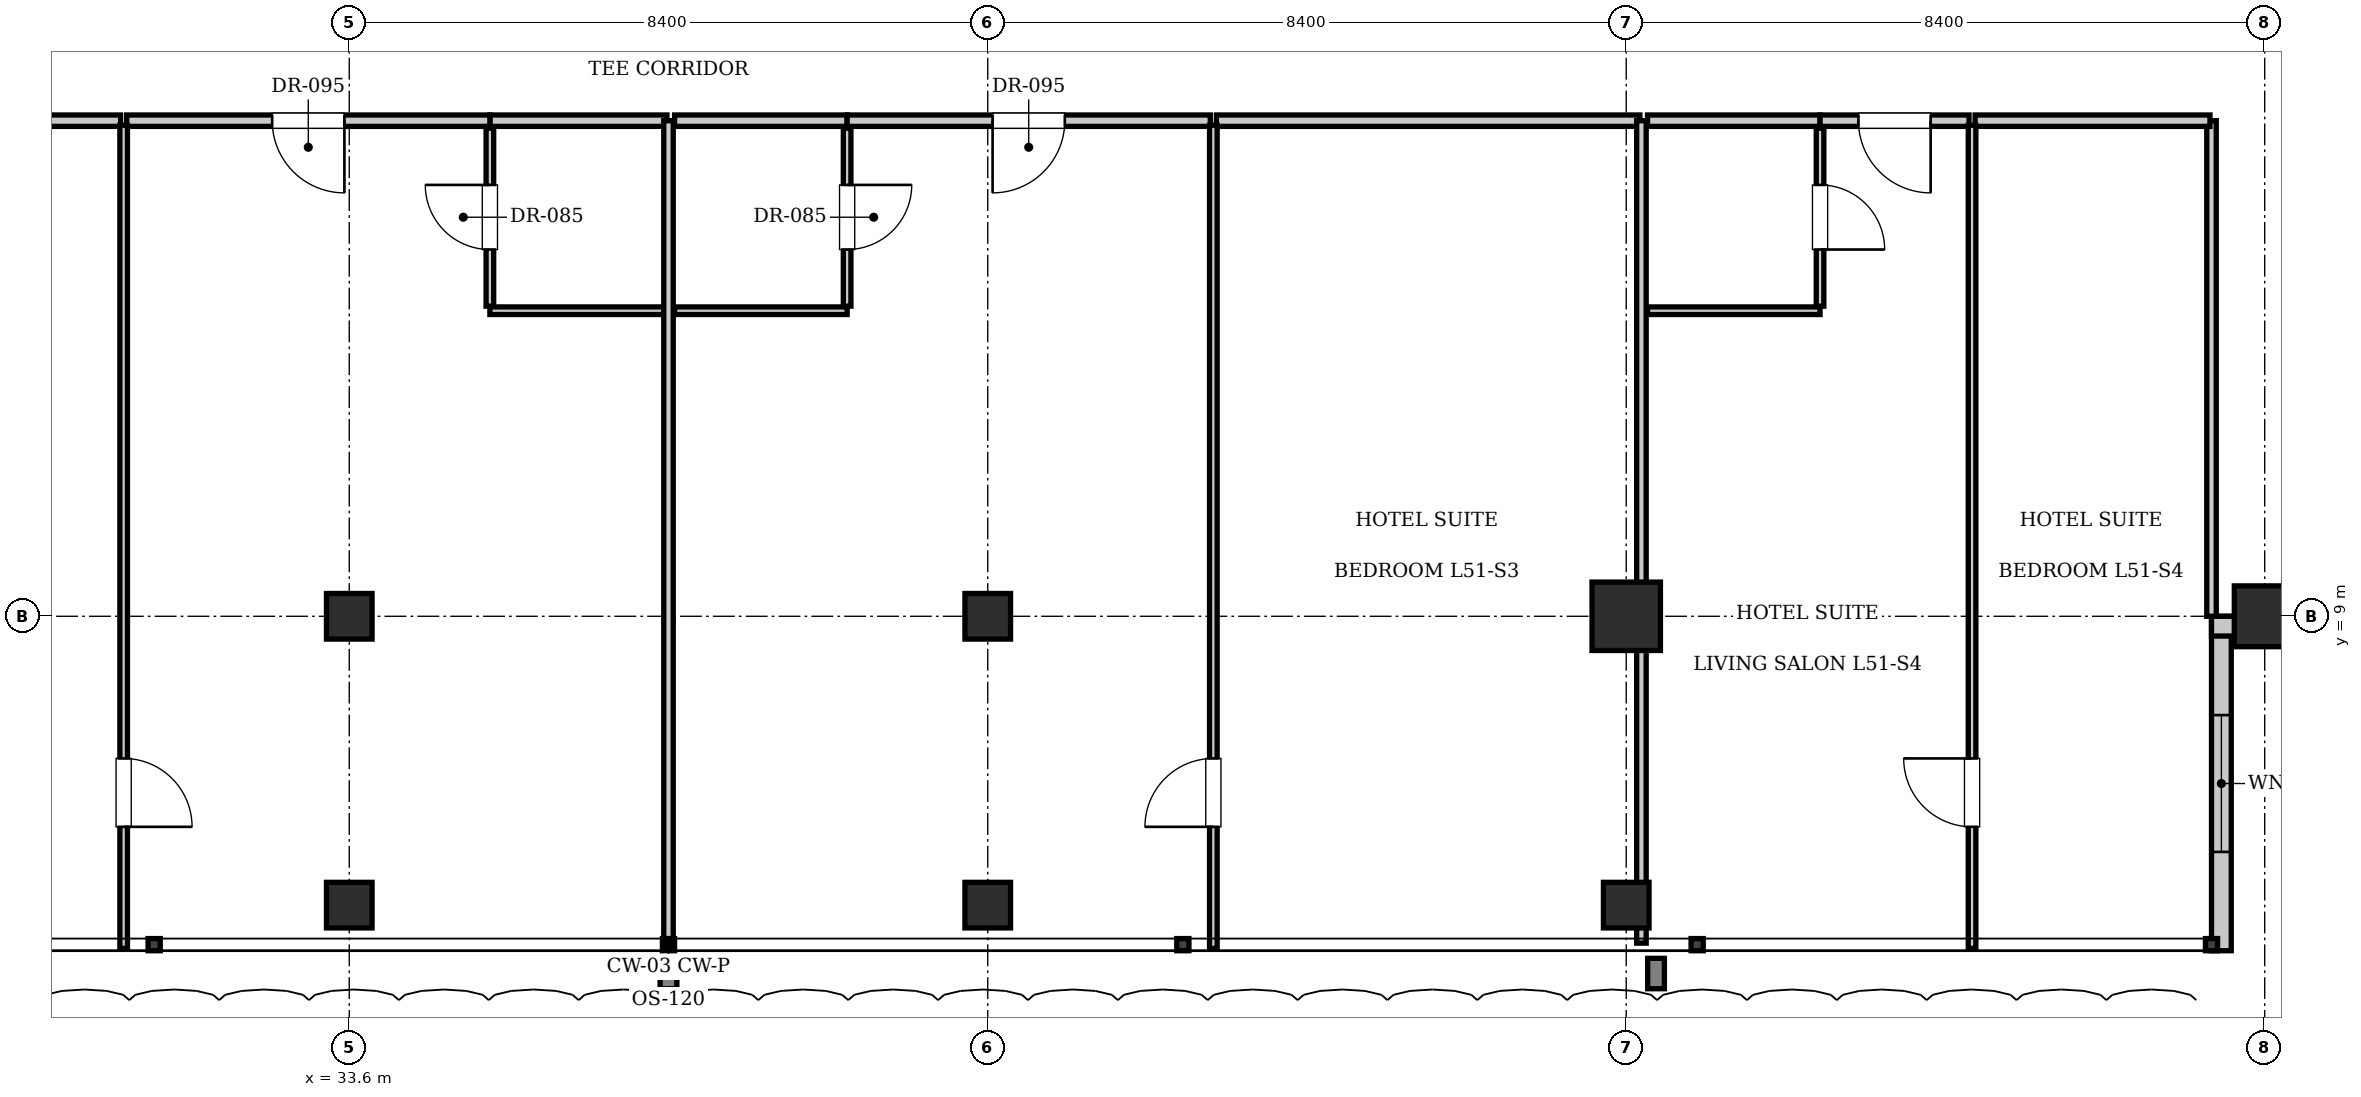
"""IFC4 building model, lengths in metres.
Left out: names, types, materials, properties, quantities, classifications, styles, units other than length and angle.
Written with IfcOpenShell. Run it as: python <this file> out.ifc"""

import sys

from ifc_helpers import new_model, si_unit, direction, frame, frame_2d, origin, origin_2d, place, context, subcontext, project, spatial, rectangle, i_section, extrude, element, fill, save


model = new_model("IFC4")
c1 = context("Model", 3, precision=1e-05, world=origin(), true_north=direction((0.0, 1.0)))
c2 = subcontext(c1, "Body", "Model", "MODEL_VIEW")
j1 = project(units=[si_unit("LENGTHUNIT", "METRE"), si_unit("PLANEANGLEUNIT", "RADIAN")], contexts=[c1])
p1 = place(None, origin())
s1 = spatial("IfcSite", under=j1, at=p1, CompositionType="ELEMENT")
p2 = place(p1, origin())
s2 = spatial("IfcBuilding", under=s1, at=p2, CompositionType="ELEMENT")
p3 = place(p2, frame((0.0, 0.0, 208.25)))
s3 = spatial("IfcBuildingStorey", under=s2, at=p3, CompositionType="ELEMENT", Elevation=208.25)
p4 = place(p3, frame((50.4, 9.0, 0.0), z_axis=(0.0, 0.0, 1.0), x_axis=(1.0, 0.0, 0.0)))
e1 = element("IfcColumn", 1, at=p4, inside=s3, PredefinedType="COLUMN", context=c2, shape_type="SweptSolid", body=[
    extrude(rectangle(XDim=0.9, YDim=0.9, at=origin_2d()), origin(), (0.0, 0.0, 1.0), 3.85),
])
for number, where, z_axis, x_axis in (
    (2, (33.6, 9.0, 0.0), (0.0, 0.0, 1.0), (1.0, 0.0, 0.0)),
    (3, (42.0, 9.0, 0.0), (0.0, 0.0, 1.0), (1.0, 0.0, 0.0)),
):
    element("IfcColumn", number, at=place(p3, frame(where, z_axis=z_axis, x_axis=x_axis)), inside=s3, PredefinedType="COLUMN", context=c2, shape_type="SweptSolid", body=[
        extrude(i_section(OverallWidth=0.6, OverallDepth=0.6, WebThickness=0.025, FlangeThickness=0.038, at=origin_2d()), origin(), (0.0, 0.0, 1.0), 3.85),
    ])
p5 = place(p3, frame((58.8, 9.0, 0.0), z_axis=(0.0, 0.0, 1.0), x_axis=(1.0, 0.0, 0.0)))
e4 = element("IfcColumn", 4, at=p5, inside=s3, PredefinedType="COLUMN", context=c2, shape_type="SweptSolid", body=[
    extrude(rectangle(XDim=0.8, YDim=0.8, at=origin_2d()), origin(), (0.0, 0.0, 1.0), 3.85),
])
for number, where, z_axis, x_axis in (
    (5, (33.6, 5.2, 0.0), (0.0, 0.0, 1.0), (1.0, 0.0, 0.0)),
    (6, (42.0, 5.2, 0.0), (0.0, 0.0, 1.0), (1.0, 0.0, 0.0)),
    (7, (50.4, 5.2, 0.0), (0.0, 0.0, 1.0), (1.0, 0.0, 0.0)),
):
    element("IfcColumn", number, at=place(p3, frame(where, z_axis=z_axis, x_axis=x_axis)), inside=s3, PredefinedType="COLUMN", context=c2, shape_type="SweptSolid", body=[
        extrude(i_section(OverallWidth=0.6, OverallDepth=0.6, WebThickness=0.025, FlangeThickness=0.038, at=origin_2d()), origin(), (0.0, 0.0, 1.0), 3.85),
    ])
p6 = place(p3, frame((58.23, 9.0, 0.0), z_axis=(0.0, 0.0, 1.0), x_axis=(0.0, -1.0, 0.0)))
e8 = element("IfcWall", 8, at=p6, inside=s3, PredefinedType="SOLIDWALL", context=c2, shape_type="SweptSolid", body=[
    extrude(rectangle(XDim=4.4, YDim=0.26, at=frame_2d((2.2, 0.0))), origin(), (0.0, 0.0, 1.0), 3.61),
])
p7 = place(p6, frame((1.3, 0.0, 0.9)))
e9 = element("IfcOpeningElement", 9, at=p7, cuts=e8, PredefinedType="OPENING", context=c2, shape_type="SweptSolid", body=[
    extrude(rectangle(XDim=1.8, YDim=2.1, at=frame_2d((0.9, 1.05))), frame((0.0, 0.14, 0.0), z_axis=(0.0, -1.0, 0.0), x_axis=(1.0, 0.0, 0.0)), (0.0, 0.0, 1.0), 0.28),
])
p8 = place(p3, frame((62.5, 8.87, 0.0), z_axis=(0.0, 0.0, 1.0), x_axis=(-1.0, 0.0, 0.0)))
e10 = element("IfcWall", 10, at=p8, inside=s3, PredefinedType="SOLIDWALL", context=c2, shape_type="SweptSolid", body=[
    extrude(rectangle(XDim=4.4, YDim=0.26, at=frame_2d((2.2, 0.0))), origin(), (0.0, 0.0, 1.0), 3.071),
])
p9 = place(p8, frame((1.3, 0.0, 0.9)))
e11 = element("IfcOpeningElement", 11, at=p9, cuts=e10, PredefinedType="OPENING", context=c2, shape_type="SweptSolid", body=[
    extrude(rectangle(XDim=1.8, YDim=2.1, at=frame_2d((0.9, 1.05))), frame((0.0, 0.14, 0.0), z_axis=(0.0, -1.0, 0.0), x_axis=(1.0, 0.0, 0.0)), (0.0, 0.0, 1.0), 0.28),
])
p10 = place(p3, frame((58.1, 9.0, 0.0), z_axis=(0.0, 0.0, 1.0), x_axis=(0.0, 1.0, 0.0)))
e12 = element("IfcWall", 12, at=p10, inside=s3, PredefinedType="PARTITIONING", context=c2, shape_type="SweptSolid", body=[
    extrude(rectangle(XDim=6.52, YDim=0.125, at=frame_2d((3.26, 0.0))), origin(), (0.0, 0.0, 1.0), 3.61),
])
p11 = place(p3, frame((35.45, 15.52, 0.0), z_axis=(0.0, 0.0, 1.0), x_axis=(1.0, 0.0, 0.0)))
e13 = element("IfcWall", 13, at=p11, inside=s3, PredefinedType="PARTITIONING", context=c2, shape_type="SweptSolid", body=[
    extrude(rectangle(XDim=2.33, YDim=0.15, at=frame_2d((1.165, 0.0))), origin(), (0.0, 0.0, 1.0), 3.61),
])
p12 = place(p3, frame((35.45, 13.02, 0.0), z_axis=(0.0, 0.0, 1.0), x_axis=(1.0, 0.0, 0.0)))
e14 = element("IfcWall", 14, at=p12, inside=s3, PredefinedType="PARTITIONING", context=c2, shape_type="SweptSolid", body=[
    extrude(rectangle(XDim=2.31, YDim=0.1, at=frame_2d((1.155, 0.0))), origin(), (0.0, 0.0, 1.0), 3.61),
])
p13 = place(p3, frame((35.45, 13.08, 0.0), z_axis=(0.0, 0.0, 1.0), x_axis=(0.0, 1.0, 0.0)))
e15 = element("IfcWall", 15, at=p13, inside=s3, PredefinedType="PARTITIONING", context=c2, shape_type="SweptSolid", body=[
    extrude(rectangle(XDim=2.34, YDim=0.1, at=frame_2d((1.17, 0.0))), origin(), (0.0, 0.0, 1.0), 3.61),
])
p14 = place(p13, frame((0.745, 0.0, 0.0)))
e16 = element("IfcOpeningElement", 16, at=p14, cuts=e15, PredefinedType="OPENING", context=c2, shape_type="SweptSolid", body=[
    extrude(rectangle(XDim=0.85, YDim=2.1, at=frame_2d((0.425, 1.05))), frame((0.0, 0.06, 0.0), z_axis=(0.0, -1.0, 0.0), x_axis=(1.0, 0.0, 0.0)), (0.0, 0.0, 1.0), 0.12),
])
p15 = place(p3, frame((25.02, 15.52, 0.0), z_axis=(0.0, 0.0, 1.0), x_axis=(1.0, 0.0, 0.0)))
e17 = element("IfcWall", 17, at=p15, inside=s3, PredefinedType="PARTITIONING", context=c2, shape_type="SweptSolid", body=[
    extrude(rectangle(XDim=5.572, YDim=0.15, at=frame_2d((2.786, 0.0))), origin(), (0.0, 0.0, 1.0), 3.61),
])
p16 = place(p3, frame((30.672, 15.52, 0.0), z_axis=(0.0, 0.0, 1.0), x_axis=(1.0, 0.0, 0.0)))
e18 = element("IfcWall", 18, at=p16, inside=s3, PredefinedType="PARTITIONING", context=c2, shape_type="SweptSolid", body=[
    extrude(rectangle(XDim=4.778, YDim=0.15, at=frame_2d((2.389, 0.0))), origin(), (0.0, 0.0, 1.0), 3.61),
])
p17 = place(p16, frame((1.914, 0.0, 0.0)))
e19 = element("IfcOpeningElement", 19, at=p17, cuts=e18, PredefinedType="OPENING", context=c2, shape_type="SweptSolid", body=[
    extrude(rectangle(XDim=0.95, YDim=2.15, at=frame_2d((0.475, 1.075))), frame((0.0, 0.085, 0.0), z_axis=(0.0, -1.0, 0.0), x_axis=(1.0, 0.0, 0.0)), (0.0, 0.0, 1.0), 0.17),
])
p18 = place(p3, frame((30.632, 4.63, 0.0), z_axis=(0.0, 0.0, 1.0), x_axis=(0.0, 1.0, 0.0)))
e20 = element("IfcWall", 20, at=p18, inside=s3, PredefinedType="PARTITIONING", context=c2, shape_type="SweptSolid", body=[
    extrude(rectangle(XDim=10.83, YDim=0.1, at=frame_2d((5.415, 0.0))), origin(), (0.0, 0.0, 1.0), 3.61),
])
p19 = place(p18, frame((1.6, 0.0, 0.0)))
e21 = element("IfcOpeningElement", 21, at=p19, cuts=e20, PredefinedType="OPENING", context=c2, shape_type="SweptSolid", body=[
    extrude(rectangle(XDim=0.9, YDim=2.1, at=frame_2d((0.45, 1.05))), frame((0.0, 0.06, 0.0), z_axis=(0.0, -1.0, 0.0), x_axis=(1.0, 0.0, 0.0)), (0.0, 0.0, 1.0), 0.12),
])
p20 = place(p3, frame((37.8, 4.7, 0.0), z_axis=(0.0, 0.0, 1.0), x_axis=(0.0, 1.0, 0.0)))
e22 = element("IfcWall", 22, at=p20, inside=s3, PredefinedType="PARTITIONING", context=c2, shape_type="SweptSolid", body=[
    extrude(rectangle(XDim=10.82, YDim=0.125, at=frame_2d((5.41, 0.0))), origin(), (0.0, 0.0, 1.0), 3.207),
])
p21 = place(p3, frame((37.88, 15.52, 0.0), z_axis=(0.0, 0.0, 1.0), x_axis=(1.0, 0.0, 0.0)))
e23 = element("IfcWall", 23, at=p21, inside=s3, PredefinedType="PARTITIONING", context=c2, shape_type="SweptSolid", body=[
    extrude(rectangle(XDim=2.27, YDim=0.15, at=frame_2d((1.135, 0.0))), origin(), (0.0, 0.0, 1.0), 3.61),
])
p22 = place(p3, frame((37.88, 13.02, 0.0), z_axis=(0.0, 0.0, 1.0), x_axis=(1.0, 0.0, 0.0)))
e24 = element("IfcWall", 24, at=p22, inside=s3, PredefinedType="PARTITIONING", context=c2, shape_type="SweptSolid", body=[
    extrude(rectangle(XDim=2.27, YDim=0.1, at=frame_2d((1.135, 0.0))), origin(), (0.0, 0.0, 1.0), 3.61),
])
p23 = place(p3, frame((40.15, 13.08, 0.0), z_axis=(0.0, 0.0, 1.0), x_axis=(0.0, 1.0, 0.0)))
e25 = element("IfcWall", 25, at=p23, inside=s3, PredefinedType="PARTITIONING", context=c2, shape_type="SweptSolid", body=[
    extrude(rectangle(XDim=2.34, YDim=0.1, at=frame_2d((1.17, 0.0))), origin(), (0.0, 0.0, 1.0), 3.61),
])
p24 = place(p23, frame((0.745, 0.0, 0.0)))
e26 = element("IfcOpeningElement", 26, at=p24, cuts=e25, PredefinedType="OPENING", context=c2, shape_type="SweptSolid", body=[
    extrude(rectangle(XDim=0.85, YDim=2.1, at=frame_2d((0.425, 1.05))), frame((0.0, 0.06, 0.0), z_axis=(0.0, -1.0, 0.0), x_axis=(1.0, 0.0, 0.0)), (0.0, 0.0, 1.0), 0.12),
])
p25 = place(p3, frame((40.15, 15.52, 0.0), z_axis=(0.0, 0.0, 1.0), x_axis=(1.0, 0.0, 0.0)))
e27 = element("IfcWall", 27, at=p25, inside=s3, PredefinedType="PARTITIONING", context=c2, shape_type="SweptSolid", body=[
    extrude(rectangle(XDim=4.778, YDim=0.15, at=frame_2d((2.389, 0.0))), origin(), (0.0, 0.0, 1.0), 3.61),
])
p26 = place(p25, frame((1.914, 0.0, 0.0)))
e28 = element("IfcOpeningElement", 28, at=p26, cuts=e27, PredefinedType="OPENING", context=c2, shape_type="SweptSolid", body=[
    extrude(rectangle(XDim=0.95, YDim=2.15, at=frame_2d((0.475, 1.075))), frame((0.0, 0.085, 0.0), z_axis=(0.0, -1.0, 0.0), x_axis=(1.0, 0.0, 0.0)), (0.0, 0.0, 1.0), 0.17),
])
p27 = place(p3, frame((45.008, 15.52, 0.0), z_axis=(0.0, 0.0, 1.0), x_axis=(1.0, 0.0, 0.0)))
e29 = element("IfcWall", 29, at=p27, inside=s3, PredefinedType="PARTITIONING", context=c2, shape_type="SweptSolid", body=[
    extrude(rectangle(XDim=5.572, YDim=0.15, at=frame_2d((2.786, 0.0))), origin(), (0.0, 0.0, 1.0), 3.61),
])
p28 = place(p3, frame((44.968, 4.63, 0.0), z_axis=(0.0, 0.0, 1.0), x_axis=(0.0, 1.0, 0.0)))
e30 = element("IfcWall", 30, at=p28, inside=s3, PredefinedType="PARTITIONING", context=c2, shape_type="SweptSolid", body=[
    extrude(rectangle(XDim=10.83, YDim=0.1, at=frame_2d((5.415, 0.0))), origin(), (0.0, 0.0, 1.0), 3.61),
])
p29 = place(p28, frame((1.6, 0.0, 0.0)))
e31 = element("IfcOpeningElement", 31, at=p29, cuts=e30, PredefinedType="OPENING", context=c2, shape_type="SweptSolid", body=[
    extrude(rectangle(XDim=0.9, YDim=2.1, at=frame_2d((0.45, 1.05))), frame((0.0, 0.06, 0.0), z_axis=(0.0, -1.0, 0.0), x_axis=(1.0, 0.0, 0.0)), (0.0, 0.0, 1.0), 0.12),
])
p30 = place(p3, frame((50.6, 4.7, 0.0), z_axis=(0.0, 0.0, 1.0), x_axis=(0.0, 1.0, 0.0)))
e32 = element("IfcWall", 32, at=p30, inside=s3, PredefinedType="PARTITIONING", context=c2, shape_type="SweptSolid", body=[
    extrude(rectangle(XDim=10.82, YDim=0.125, at=frame_2d((5.41, 0.0))), origin(), (0.0, 0.0, 1.0), 3.61),
])
p31 = place(p3, frame((50.68, 15.52, 0.0), z_axis=(0.0, 0.0, 1.0), x_axis=(1.0, 0.0, 0.0)))
e33 = element("IfcWall", 33, at=p31, inside=s3, PredefinedType="PARTITIONING", context=c2, shape_type="SweptSolid", body=[
    extrude(rectangle(XDim=2.27, YDim=0.15, at=frame_2d((1.135, 0.0))), origin(), (0.0, 0.0, 1.0), 3.61),
])
p32 = place(p3, frame((50.68, 13.02, 0.0), z_axis=(0.0, 0.0, 1.0), x_axis=(1.0, 0.0, 0.0)))
e34 = element("IfcWall", 34, at=p32, inside=s3, PredefinedType="PARTITIONING", context=c2, shape_type="SweptSolid", body=[
    extrude(rectangle(XDim=2.27, YDim=0.1, at=frame_2d((1.135, 0.0))), origin(), (0.0, 0.0, 1.0), 3.61),
])
p33 = place(p3, frame((52.95, 13.08, 0.0), z_axis=(0.0, 0.0, 1.0), x_axis=(0.0, 1.0, 0.0)))
e35 = element("IfcWall", 35, at=p33, inside=s3, PredefinedType="PARTITIONING", context=c2, shape_type="SweptSolid", body=[
    extrude(rectangle(XDim=2.34, YDim=0.1, at=frame_2d((1.17, 0.0))), origin(), (0.0, 0.0, 1.0), 3.61),
])
p34 = place(p33, frame((0.745, 0.0, 0.0)))
e36 = element("IfcOpeningElement", 36, at=p34, cuts=e35, PredefinedType="OPENING", context=c2, shape_type="SweptSolid", body=[
    extrude(rectangle(XDim=0.85, YDim=2.1, at=frame_2d((0.425, 1.05))), frame((0.0, 0.06, 0.0), z_axis=(0.0, -1.0, 0.0), x_axis=(1.0, 0.0, 0.0)), (0.0, 0.0, 1.0), 0.12),
])
p35 = place(p3, frame((52.95, 15.52, 0.0), z_axis=(0.0, 0.0, 1.0), x_axis=(1.0, 0.0, 0.0)))
e37 = element("IfcWall", 37, at=p35, inside=s3, PredefinedType="PARTITIONING", context=c2, shape_type="SweptSolid", body=[
    extrude(rectangle(XDim=1.96, YDim=0.15, at=frame_2d((0.98, 0.0))), origin(), (0.0, 0.0, 1.0), 3.61),
])
p36 = place(p35, frame((0.505, 0.0, 0.0)))
e38 = element("IfcOpeningElement", 38, at=p36, cuts=e37, PredefinedType="OPENING", context=c2, shape_type="SweptSolid", body=[
    extrude(rectangle(XDim=0.95, YDim=2.15, at=frame_2d((0.475, 1.075))), frame((0.0, 0.085, 0.0), z_axis=(0.0, -1.0, 0.0), x_axis=(1.0, 0.0, 0.0)), (0.0, 0.0, 1.0), 0.17),
])
p37 = place(p3, frame((54.99, 15.52, 0.0), z_axis=(0.0, 0.0, 1.0), x_axis=(1.0, 0.0, 0.0)))
e39 = element("IfcWall", 39, at=p37, inside=s3, PredefinedType="PARTITIONING", context=c2, shape_type="SweptSolid", body=[
    extrude(rectangle(XDim=3.09, YDim=0.15, at=frame_2d((1.545, 0.0))), origin(), (0.0, 0.0, 1.0), 3.61),
])
p38 = place(p3, frame((54.95, 4.63, 0.0), z_axis=(0.0, 0.0, 1.0), x_axis=(0.0, 1.0, 0.0)))
e40 = element("IfcWall", 40, at=p38, inside=s3, PredefinedType="PARTITIONING", context=c2, shape_type="SweptSolid", body=[
    extrude(rectangle(XDim=10.83, YDim=0.1, at=frame_2d((5.415, 0.0))), origin(), (0.0, 0.0, 1.0), 3.61),
])
p39 = place(p38, frame((1.6, 0.0, 0.0)))
e41 = element("IfcOpeningElement", 41, at=p39, cuts=e40, PredefinedType="OPENING", context=c2, shape_type="SweptSolid", body=[
    extrude(rectangle(XDim=0.9, YDim=2.1, at=frame_2d((0.45, 1.05))), frame((0.0, 0.06, 0.0), z_axis=(0.0, -1.0, 0.0), x_axis=(1.0, 0.0, 0.0)), (0.0, 0.0, 1.0), 0.12),
])
p40 = place(p7, origin())
e42 = element("IfcWindow", 42, at=p40, inside=s3, PartitioningType="SINGLE_PANEL", PredefinedType="WINDOW", context=c2, shape_type="SweptSolid", body=[
    extrude(rectangle(XDim=1.8, YDim=2.1, at=frame_2d((0.9, 1.05))), frame((0.0, 0.03, 0.0), z_axis=(0.0, -1.0, 0.0), x_axis=(1.0, 0.0, 0.0)), (0.0, 0.0, 1.0), 0.06),
])
fill(e9, e42)
p41 = place(p14, origin())
e43 = element("IfcDoor", 43, at=p41, inside=s3, OperationType="SINGLE_SWING_RIGHT", PredefinedType="DOOR", context=c2, shape_type="SweptSolid", body=[
    extrude(rectangle(XDim=0.85, YDim=2.1, at=frame_2d((0.425, 1.05))), frame((0.0, 0.025, 0.0), z_axis=(0.0, -1.0, 0.0), x_axis=(1.0, 0.0, 0.0)), (0.0, 0.0, 1.0), 0.05),
])
fill(e16, e43)
p42 = place(p17, frame((0.95, 0.0, 0.0), z_axis=(0.0, 0.0, 1.0), x_axis=(-1.0, 0.0, 0.0)))
e44 = element("IfcDoor", 44, at=p42, inside=s3, OperationType="SINGLE_SWING_LEFT", PredefinedType="DOOR", context=c2, shape_type="SweptSolid", body=[
    extrude(rectangle(XDim=0.95, YDim=2.15, at=frame_2d((0.475, 1.075))), frame((0.0, 0.025, 0.0), z_axis=(0.0, -1.0, 0.0), x_axis=(1.0, 0.0, 0.0)), (0.0, 0.0, 1.0), 0.05),
])
fill(e19, e44)
p43 = place(p19, frame((0.9, 0.0, 0.0), z_axis=(0.0, 0.0, 1.0), x_axis=(-1.0, 0.0, 0.0)))
e45 = element("IfcDoor", 45, at=p43, inside=s3, OperationType="SINGLE_SWING_RIGHT", PredefinedType="DOOR", context=c2, shape_type="SweptSolid", body=[
    extrude(rectangle(XDim=0.9, YDim=2.1, at=frame_2d((0.45, 1.05))), frame((0.0, 0.025, 0.0), z_axis=(0.0, -1.0, 0.0), x_axis=(1.0, 0.0, 0.0)), (0.0, 0.0, 1.0), 0.05),
])
fill(e21, e45)
p44 = place(p24, frame((0.85, 0.0, 0.0), z_axis=(0.0, 0.0, 1.0), x_axis=(-1.0, 0.0, 0.0)))
e46 = element("IfcDoor", 46, at=p44, inside=s3, OperationType="SINGLE_SWING_LEFT", PredefinedType="DOOR", context=c2, shape_type="SweptSolid", body=[
    extrude(rectangle(XDim=0.85, YDim=2.1, at=frame_2d((0.425, 1.05))), frame((0.0, 0.025, 0.0), z_axis=(0.0, -1.0, 0.0), x_axis=(1.0, 0.0, 0.0)), (0.0, 0.0, 1.0), 0.05),
])
fill(e26, e46)
p45 = place(p26, frame((0.95, 0.0, 0.0), z_axis=(0.0, 0.0, 1.0), x_axis=(-1.0, 0.0, 0.0)))
e47 = element("IfcDoor", 47, at=p45, inside=s3, OperationType="SINGLE_SWING_RIGHT", PredefinedType="DOOR", context=c2, shape_type="SweptSolid", body=[
    extrude(rectangle(XDim=0.95, YDim=2.15, at=frame_2d((0.475, 1.075))), frame((0.0, 0.025, 0.0), z_axis=(0.0, -1.0, 0.0), x_axis=(1.0, 0.0, 0.0)), (0.0, 0.0, 1.0), 0.05),
])
fill(e28, e47)
p46 = place(p29, origin())
e48 = element("IfcDoor", 48, at=p46, inside=s3, OperationType="SINGLE_SWING_LEFT", PredefinedType="DOOR", context=c2, shape_type="SweptSolid", body=[
    extrude(rectangle(XDim=0.9, YDim=2.1, at=frame_2d((0.45, 1.05))), frame((0.0, 0.025, 0.0), z_axis=(0.0, -1.0, 0.0), x_axis=(1.0, 0.0, 0.0)), (0.0, 0.0, 1.0), 0.05),
])
fill(e31, e48)
p47 = place(p34, frame((0.85, 0.0, 0.0), z_axis=(0.0, 0.0, 1.0), x_axis=(-1.0, 0.0, 0.0)))
e49 = element("IfcDoor", 49, at=p47, inside=s3, OperationType="SINGLE_SWING_RIGHT", PredefinedType="DOOR", context=c2, shape_type="SweptSolid", body=[
    extrude(rectangle(XDim=0.85, YDim=2.1, at=frame_2d((0.425, 1.05))), frame((0.0, 0.025, 0.0), z_axis=(0.0, -1.0, 0.0), x_axis=(1.0, 0.0, 0.0)), (0.0, 0.0, 1.0), 0.05),
])
fill(e36, e49)
p48 = place(p36, frame((0.95, 0.0, 0.0), z_axis=(0.0, 0.0, 1.0), x_axis=(-1.0, 0.0, 0.0)))
e50 = element("IfcDoor", 50, at=p48, inside=s3, OperationType="SINGLE_SWING_LEFT", PredefinedType="DOOR", context=c2, shape_type="SweptSolid", body=[
    extrude(rectangle(XDim=0.95, YDim=2.15, at=frame_2d((0.475, 1.075))), frame((0.0, 0.025, 0.0), z_axis=(0.0, -1.0, 0.0), x_axis=(1.0, 0.0, 0.0)), (0.0, 0.0, 1.0), 0.05),
])
fill(e38, e50)
p49 = place(p39, origin())
e51 = element("IfcDoor", 51, at=p49, inside=s3, OperationType="SINGLE_SWING_RIGHT", PredefinedType="DOOR", context=c2, shape_type="SweptSolid", body=[
    extrude(rectangle(XDim=0.9, YDim=2.1, at=frame_2d((0.45, 1.05))), frame((0.0, 0.025, 0.0), z_axis=(0.0, -1.0, 0.0), x_axis=(1.0, 0.0, 0.0)), (0.0, 0.0, 1.0), 0.05),
])
fill(e41, e51)
save(model, sys.argv[1])
